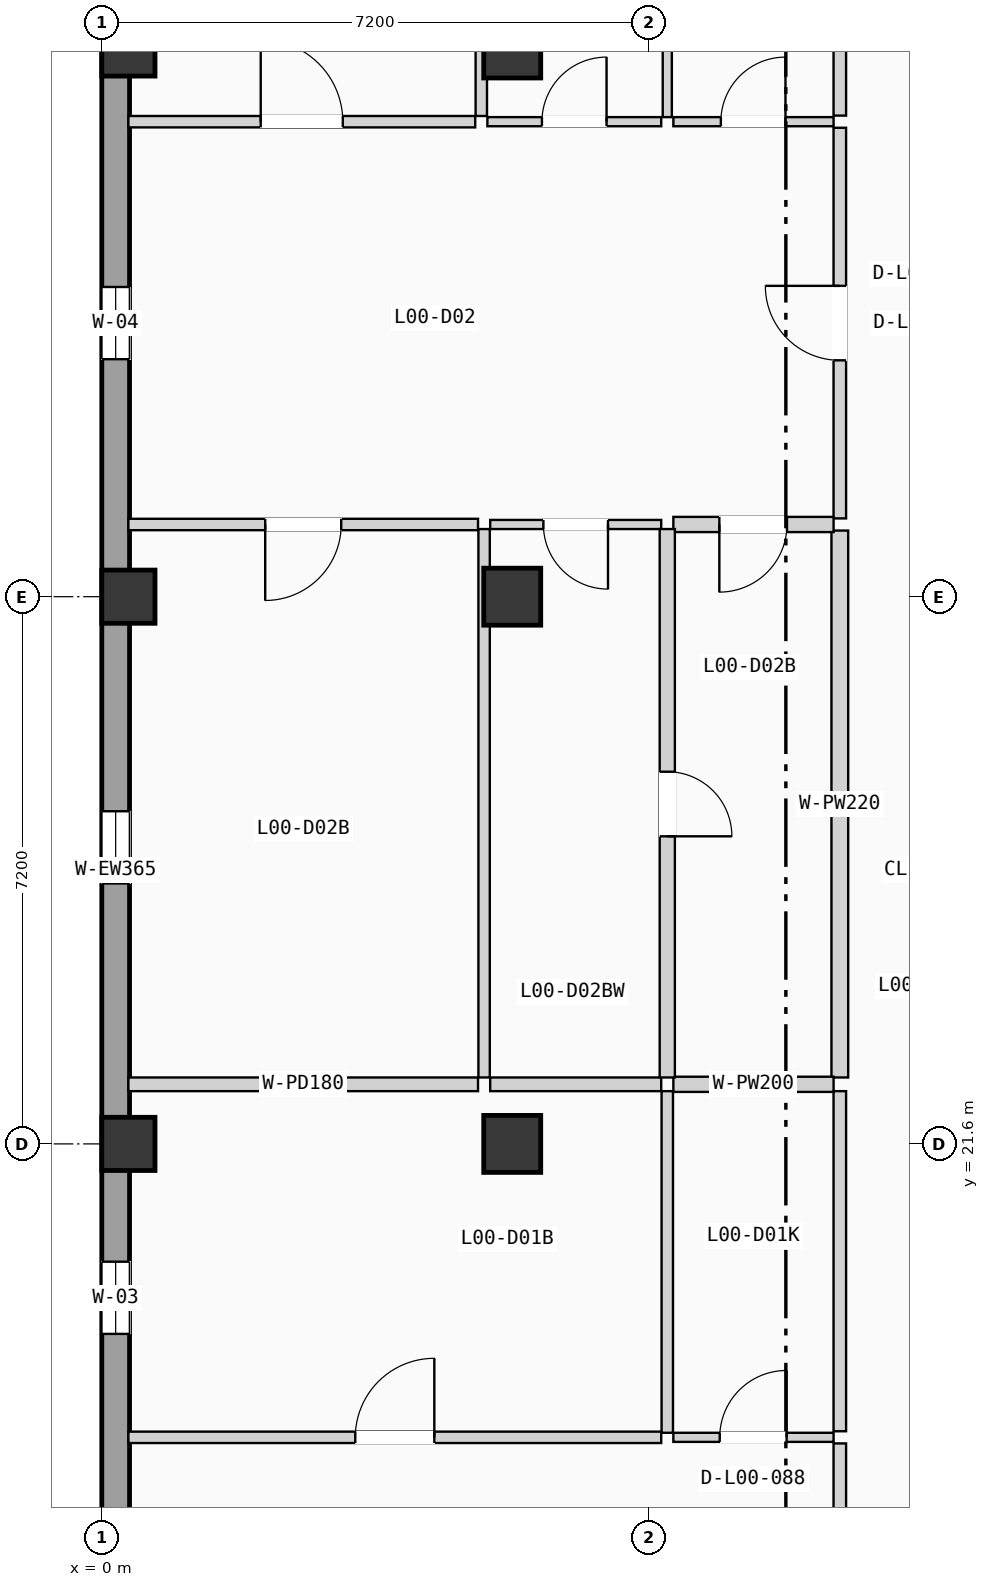
"""IFC4 building model, lengths in metres.
Left out: names, types, materials, properties, quantities, classifications, styles, units other than length and angle.
Written with IfcOpenShell. Run it as: python <this file> out.ifc"""

import sys

from ifc_helpers import new_model, si_unit, direction, frame, frame_2d, origin, origin_2d, place, context, subcontext, project, spatial, rectangle, extrude, element, fill, save


model = new_model("IFC4")
c1 = context("Model", 3, precision=1e-05, world=origin(), true_north=direction((0.0, 1.0)))
c2 = subcontext(c1, "Body", "Model", "MODEL_VIEW")
j1 = project(units=[si_unit("LENGTHUNIT", "METRE"), si_unit("PLANEANGLEUNIT", "RADIAN")], contexts=[c1])
p1 = place(None, origin())
s1 = spatial("IfcSite", under=j1, at=p1, CompositionType="ELEMENT")
p2 = place(p1, origin())
s2 = spatial("IfcBuilding", under=s1, at=p2, CompositionType="ELEMENT")
p3 = place(p2, origin())
s3 = spatial("IfcBuildingStorey", under=s2, at=p3, CompositionType="ELEMENT", Elevation=0.0)
for number, where, z_axis, x_axis in (
    (1, (0.35, 21.6, 0.0), (0.0, 0.0, 1.0), (1.0, 0.0, 0.0)),
    (2, (0.35, 28.8, 0.0), (0.0, 0.0, 1.0), (1.0, 0.0, 0.0)),
    (3, (0.35, 36.0, 0.0), (0.0, 0.0, 1.0), (1.0, 0.0, 0.0)),
):
    element("IfcColumn", number, at=place(p3, frame(where, z_axis=z_axis, x_axis=x_axis)), inside=s3, PredefinedType="COLUMN", context=c2, shape_type="SweptSolid", body=[
        extrude(rectangle(XDim=0.7, YDim=0.7, at=origin_2d()), origin(), (0.0, 0.0, 1.0), 4.9),
    ])
for number, where, z_axis, x_axis in (
    (4, (5.4, 21.6, 0.0), (0.0, 0.0, 1.0), (1.0, 0.0, 0.0)),
    (5, (5.4, 28.8, 0.0), (0.0, 0.0, 1.0), (1.0, 0.0, 0.0)),
    (6, (5.4, 36.0, 0.0), (0.0, 0.0, 1.0), (1.0, 0.0, 0.0)),
):
    element("IfcColumn", number, at=place(p3, frame(where, z_axis=z_axis, x_axis=x_axis)), inside=s3, PredefinedType="COLUMN", context=c2, shape_type="SweptSolid", body=[
        extrude(rectangle(XDim=0.75, YDim=0.75, at=origin_2d()), origin(), (0.0, 0.0, 1.0), 4.9),
    ])
p4 = place(p3, frame((0.183, 0.365, 0.0), z_axis=(0.0, 0.0, 1.0), x_axis=(0.0, 1.0, 0.0)))
e7 = element("IfcWall", 7, at=p4, inside=s3, PredefinedType="SOLIDWALL", context=c2, shape_type="SweptSolid", body=[
    extrude(rectangle(XDim=49.67, YDim=0.365, at=frame_2d((24.835, 0.0))), origin(), (0.0, 0.0, 1.0), 4.64),
])
p5 = place(p4, frame((15.325, 0.0, 0.9)))
e8 = element("IfcOpeningElement", 8, at=p5, cuts=e7, PredefinedType="OPENING", context=c2, shape_type="SweptSolid", body=[
    extrude(rectangle(XDim=0.95, YDim=1.2, at=frame_2d((0.475, 0.6))), frame((0.0, 0.192, 0.0), z_axis=(0.0, -1.0, 0.0), x_axis=(1.0, 0.0, 0.0)), (0.0, 0.0, 1.0), 0.385),
])
p6 = place(p4, frame((8.997, 0.0, 0.9)))
e9 = element("IfcOpeningElement", 9, at=p6, cuts=e7, PredefinedType="OPENING", context=c2, shape_type="SweptSolid", body=[
    extrude(rectangle(XDim=0.95, YDim=1.35, at=frame_2d((0.475, 0.675))), frame((0.0, 0.192, 0.0), z_axis=(0.0, -1.0, 0.0), x_axis=(1.0, 0.0, 0.0)), (0.0, 0.0, 1.0), 0.385),
])
p7 = place(p4, frame((18.735, 0.0, 0.9)))
e10 = element("IfcOpeningElement", 10, at=p7, cuts=e7, PredefinedType="OPENING", context=c2, shape_type="SweptSolid", body=[
    extrude(rectangle(XDim=0.95, YDim=1.5, at=frame_2d((0.475, 0.75))), frame((0.0, 0.192, 0.0), z_axis=(0.0, -1.0, 0.0), x_axis=(1.0, 0.0, 0.0)), (0.0, 0.0, 1.0), 0.385),
])
p8 = place(p4, frame((31.56, 0.0, 0.9)))
e11 = element("IfcOpeningElement", 11, at=p8, cuts=e7, PredefinedType="OPENING", context=c2, shape_type="SweptSolid", body=[
    extrude(rectangle(XDim=0.95, YDim=1.65, at=frame_2d((0.475, 0.825))), frame((0.0, 0.192, 0.0), z_axis=(0.0, -1.0, 0.0), x_axis=(1.0, 0.0, 0.0)), (0.0, 0.0, 1.0), 0.385),
])
p9 = place(p4, frame((24.662, 0.0, 0.9)))
e12 = element("IfcOpeningElement", 12, at=p9, cuts=e7, PredefinedType="OPENING", context=c2, shape_type="SweptSolid", body=[
    extrude(rectangle(XDim=0.95, YDim=1.8, at=frame_2d((0.475, 0.9))), frame((0.0, 0.192, 0.0), z_axis=(0.0, -1.0, 0.0), x_axis=(1.0, 0.0, 0.0)), (0.0, 0.0, 1.0), 0.385),
])
p10 = place(p4, frame((38.645, 0.0, 0.9)))
e13 = element("IfcOpeningElement", 13, at=p10, cuts=e7, PredefinedType="OPENING", context=c2, shape_type="SweptSolid", body=[
    extrude(rectangle(XDim=1.05, YDim=1.2, at=frame_2d((0.525, 0.6))), frame((0.0, 0.192, 0.0), z_axis=(0.0, -1.0, 0.0), x_axis=(1.0, 0.0, 0.0)), (0.0, 0.0, 1.0), 0.385),
])
p11 = place(p3, frame((9.71, 12.235, 0.0), z_axis=(0.0, 0.0, 1.0), x_axis=(0.0, 1.0, 0.0)))
e14 = element("IfcWall", 14, at=p11, inside=s3, PredefinedType="PARTITIONING", context=c2, shape_type="SweptSolid", body=[
    extrude(rectangle(XDim=5.424, YDim=0.165, at=frame_2d((2.712, 0.0))), origin(), (0.0, 0.0, 1.0), 3.84),
])
p12 = place(p11, frame((2.222, 0.0, 0.0)))
e15 = element("IfcOpeningElement", 15, at=p12, cuts=e14, PredefinedType="OPENING", context=c2, shape_type="SweptSolid", body=[
    extrude(rectangle(XDim=0.98, YDim=2.08, at=frame_2d((0.49, 1.04))), frame((0.0, 0.093, 0.0), z_axis=(0.0, -1.0, 0.0), x_axis=(1.0, 0.0, 0.0)), (0.0, 0.0, 1.0), 0.185),
])
p13 = place(p3, frame((9.71, 17.819, 0.0), z_axis=(0.0, 0.0, 1.0), x_axis=(0.0, 1.0, 0.0)))
e16 = element("IfcWall", 16, at=p13, inside=s3, PredefinedType="PARTITIONING", context=c2, shape_type="SweptSolid", body=[
    extrude(rectangle(XDim=4.475, YDim=0.165, at=frame_2d((2.237, 0.0))), origin(), (0.0, 0.0, 1.0), 3.84),
])
p14 = place(p3, frame((9.71, 29.83, 0.0), z_axis=(0.0, 0.0, 1.0), x_axis=(0.0, 1.0, 0.0)))
e17 = element("IfcWall", 17, at=p14, inside=s3, PredefinedType="PARTITIONING", context=c2, shape_type="SweptSolid", body=[
    extrude(rectangle(XDim=5.14, YDim=0.165, at=frame_2d((2.57, 0.0))), origin(), (0.0, 0.0, 1.0), 3.84),
])
p15 = place(p14, frame((2.08, 0.0, 0.0)))
e18 = element("IfcOpeningElement", 18, at=p15, cuts=e17, PredefinedType="OPENING", context=c2, shape_type="SweptSolid", body=[
    extrude(rectangle(XDim=0.98, YDim=2.08, at=frame_2d((0.49, 1.04))), frame((0.0, 0.093, 0.0), z_axis=(0.0, -1.0, 0.0), x_axis=(1.0, 0.0, 0.0)), (0.0, 0.0, 1.0), 0.185),
])
p16 = place(p3, frame((9.71, 22.474, 0.0), z_axis=(0.0, 0.0, 1.0), x_axis=(0.0, 1.0, 0.0)))
e19 = element("IfcWall", 19, at=p16, inside=s3, PredefinedType="PLUMBINGWALL", context=c2, shape_type="SweptSolid", body=[
    extrude(rectangle(XDim=7.196, YDim=0.22, at=frame_2d((3.598, 0.0))), origin(), (0.0, 0.0, 1.0), 3.84),
])
p17 = place(p3, frame((9.71, 35.13, 0.0), z_axis=(0.0, 0.0, 1.0), x_axis=(0.0, 1.0, 0.0)))
e20 = element("IfcWall", 20, at=p17, inside=s3, PredefinedType="PARTITIONING", context=c2, shape_type="SweptSolid", body=[
    extrude(rectangle(XDim=7.67, YDim=0.165, at=frame_2d((3.835, 0.0))), origin(), (0.0, 0.0, 1.0), 3.84),
])
p18 = place(p3, frame((7.52, 17.739, 0.0), z_axis=(0.0, 0.0, 1.0), x_axis=(1.0, 0.0, 0.0)))
e21 = element("IfcWall", 21, at=p18, inside=s3, PredefinedType="PARTITIONING", context=c2, shape_type="SweptSolid", body=[
    extrude(rectangle(XDim=2.108, YDim=0.12, at=frame_2d((1.054, 0.0))), origin(), (0.0, 0.0, 1.0), 3.84),
])
p19 = place(p18, frame((0.61, 0.0, 0.0)))
e22 = element("IfcOpeningElement", 22, at=p19, cuts=e21, PredefinedType="OPENING", context=c2, shape_type="SweptSolid", body=[
    extrude(rectangle(XDim=0.88, YDim=2.02, at=frame_2d((0.44, 1.01))), frame((0.0, 0.07, 0.0), z_axis=(0.0, -1.0, 0.0), x_axis=(1.0, 0.0, 0.0)), (0.0, 0.0, 1.0), 0.14),
])
p20 = place(p3, frame((0.35, 17.739, 0.0), z_axis=(0.0, 0.0, 1.0), x_axis=(1.0, 0.0, 0.0)))
e23 = element("IfcWall", 23, at=p20, inside=s3, PredefinedType="PARTITIONING", context=c2, shape_type="SweptSolid", body=[
    extrude(rectangle(XDim=7.01, YDim=0.15, at=frame_2d((3.505, 0.0))), origin(), (0.0, 0.0, 1.0), 3.84),
])
p21 = place(p20, frame((2.985, 0.0, 0.0)))
e24 = element("IfcOpeningElement", 24, at=p21, cuts=e23, PredefinedType="OPENING", context=c2, shape_type="SweptSolid", body=[
    extrude(rectangle(XDim=1.04, YDim=2.08, at=frame_2d((0.52, 1.04))), frame((0.0, 0.085, 0.0), z_axis=(0.0, -1.0, 0.0), x_axis=(1.0, 0.0, 0.0)), (0.0, 0.0, 1.0), 0.17),
])
p22 = place(p3, frame((7.44, 17.799, 0.0), z_axis=(0.0, 0.0, 1.0), x_axis=(0.0, 1.0, 0.0)))
e25 = element("IfcWall", 25, at=p22, inside=s3, PredefinedType="PARTITIONING", context=c2, shape_type="SweptSolid", body=[
    extrude(rectangle(XDim=4.495, YDim=0.15, at=frame_2d((2.248, 0.0))), origin(), (0.0, 0.0, 1.0), 3.84),
])
p23 = place(p3, frame((7.52, 22.384, 0.0), z_axis=(0.0, 0.0, 1.0), x_axis=(1.0, 0.0, 0.0)))
e26 = element("IfcWall", 26, at=p23, inside=s3, PredefinedType="PLUMBINGWALL", context=c2, shape_type="SweptSolid", body=[
    extrude(rectangle(XDim=2.108, YDim=0.2, at=frame_2d((1.054, 0.0))), origin(), (0.0, 0.0, 1.0), 3.84),
])
p24 = place(p3, frame((0.35, 22.384, 0.0), z_axis=(0.0, 0.0, 1.0), x_axis=(1.0, 0.0, 0.0)))
e27 = element("IfcWall", 27, at=p24, inside=s3, PredefinedType="PARTITIONING", context=c2, shape_type="SweptSolid", body=[
    extrude(rectangle(XDim=4.6, YDim=0.18, at=frame_2d((2.3, 0.0))), origin(), (0.0, 0.0, 1.0), 3.84),
])
p25 = place(p3, frame((5.11, 22.384, 0.0), z_axis=(0.0, 0.0, 1.0), x_axis=(1.0, 0.0, 0.0)))
e28 = element("IfcWall", 28, at=p25, inside=s3, PredefinedType="PARTITIONING", context=c2, shape_type="SweptSolid", body=[
    extrude(rectangle(XDim=2.25, YDim=0.18, at=frame_2d((1.125, 0.0))), origin(), (0.0, 0.0, 1.0), 3.84),
])
p26 = place(p3, frame((7.52, 29.75, 0.0), z_axis=(0.0, 0.0, 1.0), x_axis=(1.0, 0.0, 0.0)))
e29 = element("IfcWall", 29, at=p26, inside=s3, PredefinedType="PLUMBINGWALL", context=c2, shape_type="SweptSolid", body=[
    extrude(rectangle(XDim=2.108, YDim=0.2, at=frame_2d((1.054, 0.0))), origin(), (0.0, 0.0, 1.0), 3.84),
])
p27 = place(p26, frame((0.605, 0.0, 0.0)))
e30 = element("IfcOpeningElement", 30, at=p27, cuts=e29, PredefinedType="OPENING", context=c2, shape_type="SweptSolid", body=[
    extrude(rectangle(XDim=0.89, YDim=2.03, at=frame_2d((0.445, 1.015))), frame((0.0, 0.11, 0.0), z_axis=(0.0, -1.0, 0.0), x_axis=(1.0, 0.0, 0.0)), (0.0, 0.0, 1.0), 0.22),
])
p28 = place(p3, frame((7.52, 35.05, 0.0), z_axis=(0.0, 0.0, 1.0), x_axis=(1.0, 0.0, 0.0)))
e31 = element("IfcWall", 31, at=p28, inside=s3, PredefinedType="PARTITIONING", context=c2, shape_type="SweptSolid", body=[
    extrude(rectangle(XDim=2.108, YDim=0.12, at=frame_2d((1.054, 0.0))), origin(), (0.0, 0.0, 1.0), 3.84),
])
p29 = place(p28, frame((0.625, 0.0, 0.0)))
e32 = element("IfcOpeningElement", 32, at=p29, cuts=e31, PredefinedType="OPENING", context=c2, shape_type="SweptSolid", body=[
    extrude(rectangle(XDim=0.85, YDim=2.01, at=frame_2d((0.425, 1.005))), frame((0.0, 0.07, 0.0), z_axis=(0.0, -1.0, 0.0), x_axis=(1.0, 0.0, 0.0)), (0.0, 0.0, 1.0), 0.14),
])
p30 = place(p3, frame((0.35, 29.75, 0.0), z_axis=(0.0, 0.0, 1.0), x_axis=(1.0, 0.0, 0.0)))
e33 = element("IfcWall", 33, at=p30, inside=s3, PredefinedType="PARTITIONING", context=c2, shape_type="SweptSolid", body=[
    extrude(rectangle(XDim=4.6, YDim=0.15, at=frame_2d((2.3, 0.0))), origin(), (0.0, 0.0, 1.0), 3.84),
])
p31 = place(p30, frame((1.8, 0.0, 0.0)))
e34 = element("IfcOpeningElement", 34, at=p31, cuts=e33, PredefinedType="OPENING", context=c2, shape_type="SweptSolid", body=[
    extrude(rectangle(XDim=1.0, YDim=2.06, at=frame_2d((0.5, 1.03))), frame((0.0, 0.085, 0.0), z_axis=(0.0, -1.0, 0.0), x_axis=(1.0, 0.0, 0.0)), (0.0, 0.0, 1.0), 0.17),
])
p32 = place(p3, frame((5.11, 29.75, 0.0), z_axis=(0.0, 0.0, 1.0), x_axis=(1.0, 0.0, 0.0)))
e35 = element("IfcWall", 35, at=p32, inside=s3, PredefinedType="PARTITIONING", context=c2, shape_type="SweptSolid", body=[
    extrude(rectangle(XDim=2.25, YDim=0.12, at=frame_2d((1.125, 0.0))), origin(), (0.0, 0.0, 1.0), 3.84),
])
p33 = place(p32, frame((0.7, 0.0, 0.0)))
e36 = element("IfcOpeningElement", 36, at=p33, cuts=e35, PredefinedType="OPENING", context=c2, shape_type="SweptSolid", body=[
    extrude(rectangle(XDim=0.85, YDim=2.01, at=frame_2d((0.425, 1.005))), frame((0.0, 0.07, 0.0), z_axis=(0.0, -1.0, 0.0), x_axis=(1.0, 0.0, 0.0)), (0.0, 0.0, 1.0), 0.14),
])
p34 = place(p3, frame((0.35, 35.05, 0.0), z_axis=(0.0, 0.0, 1.0), x_axis=(1.0, 0.0, 0.0)))
e37 = element("IfcWall", 37, at=p34, inside=s3, PredefinedType="PARTITIONING", context=c2, shape_type="SweptSolid", body=[
    extrude(rectangle(XDim=4.563, YDim=0.15, at=frame_2d((2.281, 0.0))), origin(), (0.0, 0.0, 1.0), 3.84),
])
p35 = place(p34, frame((1.741, 0.0, 0.0)))
e38 = element("IfcOpeningElement", 38, at=p35, cuts=e37, PredefinedType="OPENING", context=c2, shape_type="SweptSolid", body=[
    extrude(rectangle(XDim=1.08, YDim=2.1, at=frame_2d((0.54, 1.05))), frame((0.0, 0.085, 0.0), z_axis=(0.0, -1.0, 0.0), x_axis=(1.0, 0.0, 0.0)), (0.0, 0.0, 1.0), 0.17),
])
p36 = place(p3, frame((5.073, 35.05, 0.0), z_axis=(0.0, 0.0, 1.0), x_axis=(1.0, 0.0, 0.0)))
e39 = element("IfcWall", 39, at=p36, inside=s3, PredefinedType="PARTITIONING", context=c2, shape_type="SweptSolid", body=[
    extrude(rectangle(XDim=2.287, YDim=0.12, at=frame_2d((1.144, 0.0))), origin(), (0.0, 0.0, 1.0), 3.84),
])
p37 = place(p36, frame((0.718, 0.0, 0.0)))
e40 = element("IfcOpeningElement", 40, at=p37, cuts=e39, PredefinedType="OPENING", context=c2, shape_type="SweptSolid", body=[
    extrude(rectangle(XDim=0.85, YDim=2.01, at=frame_2d((0.425, 1.005))), frame((0.0, 0.07, 0.0), z_axis=(0.0, -1.0, 0.0), x_axis=(1.0, 0.0, 0.0)), (0.0, 0.0, 1.0), 0.14),
])
p38 = place(p3, frame((7.44, 22.474, 0.0), z_axis=(0.0, 0.0, 1.0), x_axis=(0.0, 1.0, 0.0)))
e41 = element("IfcWall", 41, at=p38, inside=s3, PredefinedType="PLUMBINGWALL", context=c2, shape_type="SweptSolid", body=[
    extrude(rectangle(XDim=7.216, YDim=0.2, at=frame_2d((3.608, 0.0))), origin(), (0.0, 0.0, 1.0), 3.84),
])
p39 = place(p38, frame((3.173, 0.0, 0.0)))
e42 = element("IfcOpeningElement", 42, at=p39, cuts=e41, PredefinedType="OPENING", context=c2, shape_type="SweptSolid", body=[
    extrude(rectangle(XDim=0.85, YDim=2.01, at=frame_2d((0.425, 1.005))), frame((0.0, 0.11, 0.0), z_axis=(0.0, -1.0, 0.0), x_axis=(1.0, 0.0, 0.0)), (0.0, 0.0, 1.0), 0.22),
])
p40 = place(p3, frame((7.44, 35.11, 0.0), z_axis=(0.0, 0.0, 1.0), x_axis=(0.0, 1.0, 0.0)))
e43 = element("IfcWall", 43, at=p40, inside=s3, PredefinedType="PARTITIONING", context=c2, shape_type="SweptSolid", body=[
    extrude(rectangle(XDim=7.69, YDim=0.12, at=frame_2d((3.845, 0.0))), origin(), (0.0, 0.0, 1.0), 3.84),
])
p41 = place(p3, frame((5.03, 22.474, 0.0), z_axis=(0.0, 0.0, 1.0), x_axis=(0.0, 1.0, 0.0)))
e44 = element("IfcWall", 44, at=p41, inside=s3, PredefinedType="PARTITIONING", context=c2, shape_type="SweptSolid", body=[
    extrude(rectangle(XDim=7.216, YDim=0.15, at=frame_2d((3.608, 0.0))), origin(), (0.0, 0.0, 1.0), 3.84),
])
p42 = place(p3, frame((4.993, 35.125, 0.0), z_axis=(0.0, 0.0, 1.0), x_axis=(0.0, 1.0, 0.0)))
e45 = element("IfcWall", 45, at=p42, inside=s3, PredefinedType="PARTITIONING", context=c2, shape_type="SweptSolid", body=[
    extrude(rectangle(XDim=7.675, YDim=0.15, at=frame_2d((3.837, 0.0))), origin(), (0.0, 0.0, 1.0), 3.84),
])
p43 = place(p7, origin())
e46 = element("IfcWindow", 46, at=p43, inside=s3, PartitioningType="SINGLE_PANEL", PredefinedType="WINDOW", context=c2, shape_type="SweptSolid", body=[
    extrude(rectangle(XDim=0.95, YDim=1.5, at=frame_2d((0.475, 0.75))), frame((0.0, 0.03, 0.0), z_axis=(0.0, -1.0, 0.0), x_axis=(1.0, 0.0, 0.0)), (0.0, 0.0, 1.0), 0.06),
])
fill(e10, e46)
p44 = place(p8, origin())
e47 = element("IfcWindow", 47, at=p44, inside=s3, PartitioningType="SINGLE_PANEL", PredefinedType="WINDOW", context=c2, shape_type="SweptSolid", body=[
    extrude(rectangle(XDim=0.95, YDim=1.65, at=frame_2d((0.475, 0.825))), frame((0.0, 0.03, 0.0), z_axis=(0.0, -1.0, 0.0), x_axis=(1.0, 0.0, 0.0)), (0.0, 0.0, 1.0), 0.06),
])
fill(e11, e47)
p45 = place(p9, origin())
e48 = element("IfcWindow", 48, at=p45, inside=s3, PartitioningType="SINGLE_PANEL", PredefinedType="WINDOW", context=c2, shape_type="SweptSolid", body=[
    extrude(rectangle(XDim=0.95, YDim=1.8, at=frame_2d((0.475, 0.9))), frame((0.0, 0.03, 0.0), z_axis=(0.0, -1.0, 0.0), x_axis=(1.0, 0.0, 0.0)), (0.0, 0.0, 1.0), 0.06),
])
fill(e12, e48)
p46 = place(p15, origin())
e49 = element("IfcDoor", 49, at=p46, inside=s3, OperationType="SINGLE_SWING_RIGHT", PredefinedType="DOOR", context=c2, shape_type="SweptSolid", body=[
    extrude(rectangle(XDim=0.98, YDim=2.08, at=frame_2d((0.49, 1.04))), frame((0.0, 0.025, 0.0), z_axis=(0.0, -1.0, 0.0), x_axis=(1.0, 0.0, 0.0)), (0.0, 0.0, 1.0), 0.05),
])
fill(e18, e49)
p47 = place(p19, origin())
e50 = element("IfcDoor", 50, at=p47, inside=s3, OperationType="SINGLE_SWING_RIGHT", PredefinedType="DOOR", context=c2, shape_type="SweptSolid", body=[
    extrude(rectangle(XDim=0.88, YDim=2.02, at=frame_2d((0.44, 1.01))), frame((0.0, 0.025, 0.0), z_axis=(0.0, -1.0, 0.0), x_axis=(1.0, 0.0, 0.0)), (0.0, 0.0, 1.0), 0.05),
])
fill(e22, e50)
p48 = place(p21, origin())
e51 = element("IfcDoor", 51, at=p48, inside=s3, OperationType="SINGLE_SWING_RIGHT", PredefinedType="DOOR", context=c2, shape_type="SweptSolid", body=[
    extrude(rectangle(XDim=1.04, YDim=2.08, at=frame_2d((0.52, 1.04))), frame((0.0, 0.025, 0.0), z_axis=(0.0, -1.0, 0.0), x_axis=(1.0, 0.0, 0.0)), (0.0, 0.0, 1.0), 0.05),
])
fill(e24, e51)
p49 = place(p27, frame((0.89, 0.0, 0.0), z_axis=(0.0, 0.0, 1.0), x_axis=(-1.0, 0.0, 0.0)))
e52 = element("IfcDoor", 52, at=p49, inside=s3, OperationType="SINGLE_SWING_LEFT", PredefinedType="DOOR", context=c2, shape_type="SweptSolid", body=[
    extrude(rectangle(XDim=0.89, YDim=2.03, at=frame_2d((0.445, 1.015))), frame((0.0, 0.025, 0.0), z_axis=(0.0, -1.0, 0.0), x_axis=(1.0, 0.0, 0.0)), (0.0, 0.0, 1.0), 0.05),
])
fill(e30, e52)
p50 = place(p29, origin())
e53 = element("IfcDoor", 53, at=p50, inside=s3, OperationType="SINGLE_SWING_RIGHT", PredefinedType="DOOR", context=c2, shape_type="SweptSolid", body=[
    extrude(rectangle(XDim=0.85, YDim=2.01, at=frame_2d((0.425, 1.005))), frame((0.0, 0.025, 0.0), z_axis=(0.0, -1.0, 0.0), x_axis=(1.0, 0.0, 0.0)), (0.0, 0.0, 1.0), 0.05),
])
fill(e32, e53)
p51 = place(p31, frame((1.0, 0.0, 0.0), z_axis=(0.0, 0.0, 1.0), x_axis=(-1.0, 0.0, 0.0)))
e54 = element("IfcDoor", 54, at=p51, inside=s3, OperationType="SINGLE_SWING_LEFT", PredefinedType="DOOR", context=c2, shape_type="SweptSolid", body=[
    extrude(rectangle(XDim=1.0, YDim=2.06, at=frame_2d((0.5, 1.03))), frame((0.0, 0.025, 0.0), z_axis=(0.0, -1.0, 0.0), x_axis=(1.0, 0.0, 0.0)), (0.0, 0.0, 1.0), 0.05),
])
fill(e34, e54)
p52 = place(p33, frame((0.85, 0.0, 0.0), z_axis=(0.0, 0.0, 1.0), x_axis=(-1.0, 0.0, 0.0)))
e55 = element("IfcDoor", 55, at=p52, inside=s3, OperationType="SINGLE_SWING_RIGHT", PredefinedType="DOOR", context=c2, shape_type="SweptSolid", body=[
    extrude(rectangle(XDim=0.85, YDim=2.01, at=frame_2d((0.425, 1.005))), frame((0.0, 0.025, 0.0), z_axis=(0.0, -1.0, 0.0), x_axis=(1.0, 0.0, 0.0)), (0.0, 0.0, 1.0), 0.05),
])
fill(e36, e55)
p53 = place(p35, origin())
e56 = element("IfcDoor", 56, at=p53, inside=s3, OperationType="SINGLE_SWING_LEFT", PredefinedType="DOOR", context=c2, shape_type="SweptSolid", body=[
    extrude(rectangle(XDim=1.08, YDim=2.1, at=frame_2d((0.54, 1.05))), frame((0.0, 0.025, 0.0), z_axis=(0.0, -1.0, 0.0), x_axis=(1.0, 0.0, 0.0)), (0.0, 0.0, 1.0), 0.05),
])
fill(e38, e56)
p54 = place(p37, origin())
e57 = element("IfcDoor", 57, at=p54, inside=s3, OperationType="SINGLE_SWING_RIGHT", PredefinedType="DOOR", context=c2, shape_type="SweptSolid", body=[
    extrude(rectangle(XDim=0.85, YDim=2.01, at=frame_2d((0.425, 1.005))), frame((0.0, 0.025, 0.0), z_axis=(0.0, -1.0, 0.0), x_axis=(1.0, 0.0, 0.0)), (0.0, 0.0, 1.0), 0.05),
])
fill(e40, e57)
p55 = place(p39, frame((0.85, 0.0, 0.0), z_axis=(0.0, 0.0, 1.0), x_axis=(-1.0, 0.0, 0.0)))
e58 = element("IfcDoor", 58, at=p55, inside=s3, OperationType="SINGLE_SWING_LEFT", PredefinedType="DOOR", context=c2, shape_type="SweptSolid", body=[
    extrude(rectangle(XDim=0.85, YDim=2.01, at=frame_2d((0.425, 1.005))), frame((0.0, 0.025, 0.0), z_axis=(0.0, -1.0, 0.0), x_axis=(1.0, 0.0, 0.0)), (0.0, 0.0, 1.0), 0.05),
])
fill(e42, e58)
save(model, sys.argv[1])
